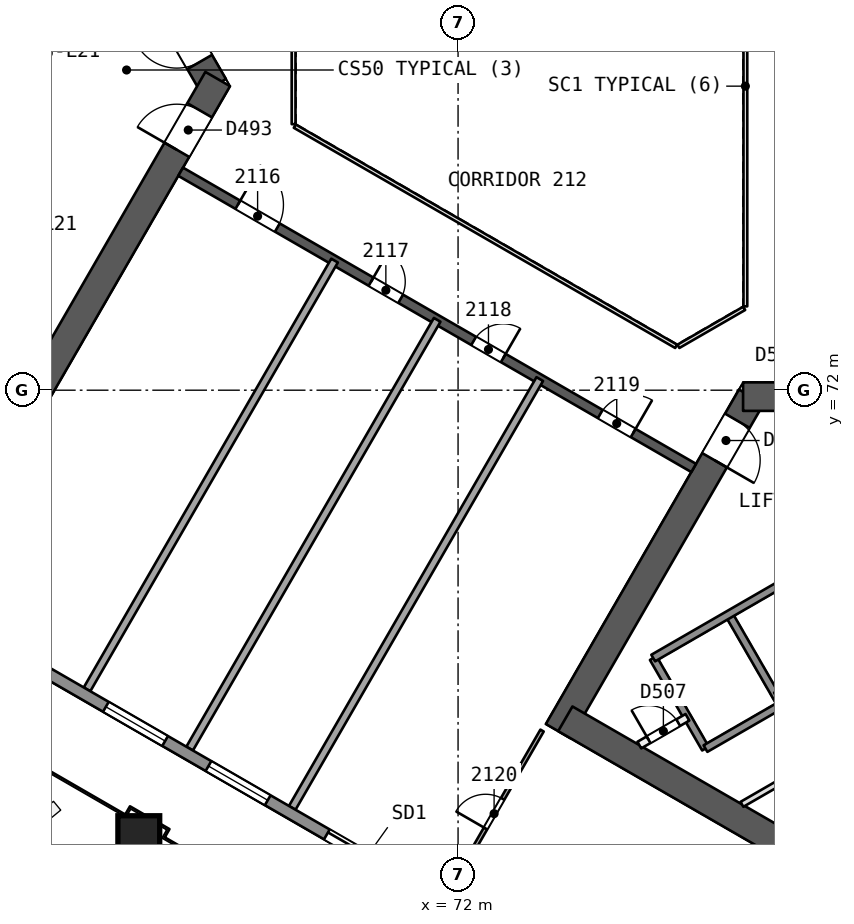
"""IFC4 building model, lengths in metres.
Left out: names, types, materials, properties, quantities, classifications, styles, units other than length and angle.
Written with IfcOpenShell. Run it as: python <this file> out.ifc"""

import sys

from ifc_helpers import new_model, si_unit, direction, frame, frame_2d, origin, origin_2d, place, context, subcontext, project, spatial, rectangle, extrude, element, fill, save


model = new_model("IFC4")
c1 = context("Model", 3, precision=1e-05, world=origin(), true_north=direction((0.0, 1.0)))
c2 = subcontext(c1, "Body", "Model", "MODEL_VIEW")
j1 = project(units=[si_unit("LENGTHUNIT", "METRE"), si_unit("PLANEANGLEUNIT", "RADIAN")], contexts=[c1])
p1 = place(None, origin())
s1 = spatial("IfcSite", under=j1, at=p1, CompositionType="ELEMENT")
p2 = place(p1, origin())
s2 = spatial("IfcBuilding", under=s1, at=p2, CompositionType="ELEMENT")
p3 = place(p2, frame((0.0, 0.0, 90.6)))
s3 = spatial("IfcBuildingStorey", under=s2, at=p3, CompositionType="ELEMENT", Elevation=90.6)
p4 = place(p3, frame((65.567, 80.0, 0.0), z_axis=(0.0, 0.0, 1.0), x_axis=(-0.499988615364, 0.866031976607, 0.0)))
e1 = element("IfcWall", 1, at=p4, inside=s3, PredefinedType="SHEAR", context=c2, shape_type="SweptSolid", body=[
    extrude(rectangle(XDim=10.163, YDim=0.75, at=frame_2d((5.082, 0.0))), origin(), (0.0, 0.0, 1.0), 3.7),
])
p5 = place(p4, frame((0.733, 0.0, 0.0)))
e2 = element("IfcOpeningElement", 2, at=p5, cuts=e1, PredefinedType="OPENING", context=c2, shape_type="SweptSolid", body=[
    extrude(rectangle(XDim=1.2, YDim=2.1, at=frame_2d((0.6, 1.05))), frame((0.0, 0.385, 0.0), z_axis=(0.0, -1.0, 0.0), x_axis=(1.0, 0.0, 0.0)), (0.0, 0.0, 1.0), 0.771),
])
p6 = place(p3, frame((60.673, 71.523, 0.0), z_axis=(0.0, 0.0, 1.0), x_axis=(0.499997052475, 0.866027105532, 0.0)))
e3 = element("IfcWall", 3, at=p6, inside=s3, PredefinedType="SHEAR", context=c2, shape_type="SweptSolid", body=[
    extrude(rectangle(XDim=10.005, YDim=0.75, at=frame_2d((5.002, 0.0))), origin(), (0.0, 0.0, 1.0), 3.7),
])
p7 = place(p6, frame((7.855, 0.0, 0.0)))
e4 = element("IfcOpeningElement", 4, at=p7, cuts=e3, PredefinedType="OPENING", context=c2, shape_type="SweptSolid", body=[
    extrude(rectangle(XDim=1.2, YDim=2.1, at=frame_2d((0.6, 1.05))), frame((0.0, 0.385, 0.0), z_axis=(0.0, -1.0, 0.0), x_axis=(1.0, 0.0, 0.0)), (0.0, 0.0, 1.0), 0.771),
])
p8 = place(p3, frame((79.717, 71.831, 0.0), z_axis=(0.0, 0.0, 1.0), x_axis=(-0.499996230114, -0.866027580318, 0.0)))
e5 = element("IfcWall", 5, at=p8, inside=s3, PredefinedType="SHEAR", context=c2, shape_type="SweptSolid", body=[
    extrude(rectangle(XDim=10.164, YDim=0.75, at=frame_2d((5.082, 0.0))), origin(), (0.0, 0.0, 1.0), 3.7),
])
p9 = place(p8, frame((0.733, 0.0, 0.0)))
e6 = element("IfcOpeningElement", 6, at=p9, cuts=e5, PredefinedType="OPENING", context=c2, shape_type="SweptSolid", body=[
    extrude(rectangle(XDim=1.2, YDim=2.1, at=frame_2d((0.6, 1.05))), frame((0.0, 0.385, 0.0), z_axis=(0.0, -1.0, 0.0), x_axis=(1.0, 0.0, 0.0)), (0.0, 0.0, 1.0), 0.771),
])
p10 = place(p3, frame((74.822, 63.354, 0.0), z_axis=(0.0, 0.0, 1.0), x_axis=(0.8660248072, -0.500001033313, 0.0)))
e7 = element("IfcWall", 7, at=p10, inside=s3, PredefinedType="SHEAR", context=c2, shape_type="SweptSolid", body=[
    extrude(rectangle(XDim=13.958, YDim=0.75, at=frame_2d((6.979, 0.0))), origin(), (0.0, 0.0, 1.0), 3.7),
])
p11 = place(p3, frame((89.505, 71.831, 0.0), z_axis=(0.0, 0.0, 1.0), x_axis=(-1.0, 0.0, 0.0)))
e8 = element("IfcWall", 8, at=p11, inside=s3, PredefinedType="SHEAR", context=c2, shape_type="SweptSolid", body=[
    extrude(rectangle(XDim=10.005, YDim=0.75, at=frame_2d((5.002, 0.0))), origin(), (0.0, 0.0, 1.0), 3.7),
])
p12 = place(p11, frame((7.855, 0.0, 0.0)))
e9 = element("IfcOpeningElement", 9, at=p12, cuts=e8, PredefinedType="OPENING", context=c2, shape_type="SweptSolid", body=[
    extrude(rectangle(XDim=1.2, YDim=2.1, at=frame_2d((0.6, 1.05))), frame((0.0, 0.385, 0.0), z_axis=(0.0, -1.0, 0.0), x_axis=(1.0, 0.0, 0.0)), (0.0, 0.0, 1.0), 0.771),
])
p13 = place(p3, frame((64.7, 77.748, 0.0), z_axis=(0.0, 0.0, 1.0), x_axis=(0.866026492143, -0.499998114903, 0.0)))
e10 = element("IfcWall", 10, at=p13, inside=s3, PredefinedType="SHEAR", context=c2, shape_type="SweptSolid", body=[
    extrude(rectangle(XDim=15.588, YDim=0.25, at=frame_2d((7.794, 0.0))), origin(), (0.0, 0.0, 1.0), 3.2),
])
p14 = place(p13, frame((1.738, 0.0, 0.0)))
e11 = element("IfcOpeningElement", 11, at=p14, cuts=e10, PredefinedType="OPENING", context=c2, shape_type="SweptSolid", body=[
    extrude(rectangle(XDim=1.2, YDim=2.4, at=frame_2d((0.6, 1.2))), frame((0.0, 0.135, 0.0), z_axis=(0.0, -1.0, 0.0), x_axis=(1.0, 0.0, 0.0)), (0.0, 0.0, 1.0), 0.271),
])
p15 = place(p13, frame((5.785, 0.0, 0.0)))
e12 = element("IfcOpeningElement", 12, at=p15, cuts=e10, PredefinedType="OPENING", context=c2, shape_type="SweptSolid", body=[
    extrude(rectangle(XDim=0.9, YDim=2.1, at=frame_2d((0.45, 1.05))), frame((0.0, 0.135, 0.0), z_axis=(0.0, -1.0, 0.0), x_axis=(1.0, 0.0, 0.0)), (0.0, 0.0, 1.0), 0.271),
])
p16 = place(p13, frame((8.903, 0.0, 0.0)))
e13 = element("IfcOpeningElement", 13, at=p16, cuts=e10, PredefinedType="OPENING", context=c2, shape_type="SweptSolid", body=[
    extrude(rectangle(XDim=0.9, YDim=2.1, at=frame_2d((0.45, 1.05))), frame((0.0, 0.135, 0.0), z_axis=(0.0, -1.0, 0.0), x_axis=(1.0, 0.0, 0.0)), (0.0, 0.0, 1.0), 0.271),
])
p17 = place(p13, frame((12.75, 0.0, 0.0)))
e14 = element("IfcOpeningElement", 14, at=p17, cuts=e10, PredefinedType="OPENING", context=c2, shape_type="SweptSolid", body=[
    extrude(rectangle(XDim=1.0, YDim=2.1, at=frame_2d((0.5, 1.05))), frame((0.0, 0.135, 0.0), z_axis=(0.0, -1.0, 0.0), x_axis=(1.0, 0.0, 0.0)), (0.0, 0.0, 1.0), 0.271),
])
p18 = place(p3, frame((63.587, 60.232, 0.0), z_axis=(0.010093620709, 0.017482414954, 0.999796221231), x_axis=(-0.499907122366, -0.865843723195, 0.020187025824)))
e15 = element("IfcColumn", 15, at=p18, inside=s3, PredefinedType="COLUMN", context=c2, shape_type="SweptSolid", body=[
    extrude(rectangle(XDim=1.1, YDim=1.1, at=origin_2d()), origin(), (0.0, 0.0, 1.0), 3.701),
])
for number, where, z_axis, x_axis in (
    (16, (62.236, 64.128, 0.0), (0.0, 0.0, 1.0), (0.5, 0.866, 0.0)),
    (17, (64.936, 62.569, 0.0), (0.0, 0.0, 1.0), (0.5, 0.866, 0.0)),
    (18, (67.636, 61.01, 0.0), (0.0, 0.0, 1.0), (0.5, 0.866, 0.0)),
):
    element("IfcWall", number, at=place(p3, frame(where, z_axis=z_axis, x_axis=x_axis)), inside=s3, PredefinedType="PARTITIONING", context=c2, shape_type="SweptSolid", body=[
        extrude(rectangle(XDim=13.028, YDim=0.2, at=frame_2d((6.514, 0.0))), origin(), (0.0, 0.0, 1.0), 3.2),
    ])
p19 = place(p3, frame((71.686, 58.672, 0.0), z_axis=(0.0, 0.0, 1.0), x_axis=(0.49997221919, 0.866041442448, 0.0)))
e19 = element("IfcWall", 19, at=p19, inside=s3, PredefinedType="PARTITIONING", context=c2, shape_type="SweptSolid", body=[
    extrude(rectangle(XDim=5.049, YDim=0.1, at=frame_2d((2.524, 0.0))), origin(), (0.0, 0.0, 1.0), 3.2),
])
p20 = place(p19, frame((2.074, 0.0, 0.0)))
e20 = element("IfcOpeningElement", 20, at=p20, cuts=e19, PredefinedType="OPENING", context=c2, shape_type="SweptSolid", body=[
    extrude(rectangle(XDim=0.9, YDim=2.1, at=frame_2d((0.45, 1.05))), frame((0.0, 0.061, 0.0), z_axis=(0.0, -1.0, 0.0), x_axis=(1.0, 0.0, 0.0)), (0.0, 0.0, 1.0), 0.121),
])
p21 = place(p3, frame((90.11, 47.863, 0.0), z_axis=(0.0, 0.0, 1.0), x_axis=(-0.866024236478, 0.500002021829, 0.0)))
e21 = element("IfcWall", 21, at=p21, inside=s3, PredefinedType="SOLIDWALL", context=c2, shape_type="SweptSolid", body=[
    extrude(rectangle(XDim=58.307, YDim=0.3, at=frame_2d((29.154, 0.0))), origin(), (0.0, 0.0, 1.0), 3.2),
])
p22 = place(p21, frame((44.133, 0.0, 0.0)))
e22 = element("IfcOpeningElement", 22, at=p22, cuts=e21, PredefinedType="OPENING", context=c2, shape_type="SweptSolid", body=[
    extrude(rectangle(XDim=2.4, YDim=2.4, at=frame_2d((1.2, 1.2))), frame((0.0, 0.161, 0.0), z_axis=(0.0, -1.0, 0.0), x_axis=(1.0, 0.0, 0.0)), (0.0, 0.0, 1.0), 0.321),
])
p23 = place(p21, frame((22.498, 0.0, 0.0)))
e23 = element("IfcOpeningElement", 23, at=p23, cuts=e21, PredefinedType="OPENING", context=c2, shape_type="SweptSolid", body=[
    extrude(rectangle(XDim=2.4, YDim=2.4, at=frame_2d((1.2, 1.2))), frame((0.0, 0.161, 0.0), z_axis=(0.0, -1.0, 0.0), x_axis=(1.0, 0.0, 0.0)), (0.0, 0.0, 1.0), 0.321),
])
p24 = place(p21, frame((10.65, 0.0, 0.0)))
e24 = element("IfcOpeningElement", 24, at=p24, cuts=e21, PredefinedType="OPENING", context=c2, shape_type="SweptSolid", body=[
    extrude(rectangle(XDim=2.4, YDim=2.4, at=frame_2d((1.2, 1.2))), frame((0.0, 0.161, 0.0), z_axis=(0.0, -1.0, 0.0), x_axis=(1.0, 0.0, 0.0)), (0.0, 0.0, 1.0), 0.321),
])
p25 = place(p21, frame((29.812, 0.0, 0.9)))
e25 = element("IfcOpeningElement", 25, at=p25, cuts=e21, PredefinedType="OPENING", context=c2, shape_type="SweptSolid", body=[
    extrude(rectangle(XDim=1.8, YDim=1.5, at=frame_2d((0.9, 0.75))), frame((0.0, 0.161, 0.0), z_axis=(0.0, -1.0, 0.0), x_axis=(1.0, 0.0, 0.0)), (0.0, 0.0, 1.0), 0.321),
])
p26 = place(p21, frame((26.695, 0.0, 0.9)))
e26 = element("IfcOpeningElement", 26, at=p26, cuts=e21, PredefinedType="OPENING", context=c2, shape_type="SweptSolid", body=[
    extrude(rectangle(XDim=1.8, YDim=1.5, at=frame_2d((0.9, 0.75))), frame((0.0, 0.161, 0.0), z_axis=(0.0, -1.0, 0.0), x_axis=(1.0, 0.0, 0.0)), (0.0, 0.0, 1.0), 0.321),
])
for number, where, z_axis, x_axis in (
    (27, (77.135, 64.952, 0.0), (0.0, 0.0, 1.0), (0.5, -0.866, 0.0)),
    (28, (79.127, 66.102, 0.0), (0.0, 0.0, 1.0), (0.5, -0.866, 0.0)),
):
    element("IfcWall", number, at=place(p3, frame(where, z_axis=z_axis, x_axis=x_axis)), inside=s3, PredefinedType="SOLIDWALL", context=c2, shape_type="SweptSolid", body=[
        extrude(rectangle(XDim=2.75, YDim=0.2, at=frame_2d((1.375, 0.0))), origin(), (0.0, 0.0, 1.0), 3.2),
    ])
p27 = place(p3, frame((77.135, 64.952, 0.0), z_axis=(0.0, 0.0, 1.0), x_axis=(0.866031916153, 0.499988720078, 0.0)))
e29 = element("IfcWall", 29, at=p27, inside=s3, PredefinedType="SOLIDWALL", context=c2, shape_type="SweptSolid", body=[
    extrude(rectangle(XDim=11.35, YDim=0.2, at=frame_2d((5.675, 0.0))), origin(), (0.0, 0.0, 1.0), 3.2),
])
p28 = place(p3, frame((76.77, 62.662, 0.0), z_axis=(0.0, 0.0, 1.0), x_axis=(0.866054810376, 0.49994906283, 0.0)))
e30 = element("IfcWall", 30, at=p28, inside=s3, PredefinedType="PARTITIONING", context=c2, shape_type="SweptSolid", body=[
    extrude(rectangle(XDim=1.461, YDim=0.2, at=frame_2d((0.73, 0.0))), origin(), (0.0, 0.0, 1.0), 3.2),
])
p29 = place(p28, frame((0.281, 0.0, 0.0)))
e31 = element("IfcOpeningElement", 31, at=p29, cuts=e30, PredefinedType="OPENING", context=c2, shape_type="SweptSolid", body=[
    extrude(rectangle(XDim=0.9, YDim=2.1, at=frame_2d((0.45, 1.05))), frame((0.0, 0.11, 0.0), z_axis=(0.0, -1.0, 0.0), x_axis=(1.0, 0.0, 0.0)), (0.0, 0.0, 1.0), 0.221),
])
p30 = place(p3, frame((80.367, 63.954, 0.0), z_axis=(0.0, 0.0, 1.0), x_axis=(0.866026575979, 0.499997969693, 0.0)))
e32 = element("IfcWall", 32, at=p30, inside=s3, PredefinedType="SOLIDWALL", context=c2, shape_type="SweptSolid", body=[
    extrude(rectangle(XDim=6.75, YDim=0.2, at=frame_2d((3.375, 0.0))), origin(), (0.0, 0.0, 1.0), 3.2),
])
p31 = place(p3, frame((78.51, 62.57, 0.0), z_axis=(0.0, 0.0, 1.0), x_axis=(0.866053019151, 0.499952165731, 0.0)))
e33 = element("IfcWall", 33, at=p31, inside=s3, PredefinedType="SOLIDWALL", context=c2, shape_type="SweptSolid", body=[
    extrude(rectangle(XDim=2.3, YDim=0.2, at=frame_2d((1.15, 0.0))), origin(), (0.0, 0.0, 1.0), 3.2),
])
p32 = place(p3, frame((79.47, 61.103, 0.0), z_axis=(0.0, 0.0, 1.0), x_axis=(0.866021168401, 0.500007335828, 0.0)))
e34 = element("IfcWall", 34, at=p32, inside=s3, PredefinedType="PARTITIONING", context=c2, shape_type="SweptSolid", body=[
    extrude(rectangle(XDim=2.077, YDim=0.15, at=frame_2d((1.039, 0.0))), origin(), (0.0, 0.0, 1.0), 3.2),
])
p33 = place(p3, frame((79.56, 74.206, 0.0), z_axis=(0.0, 0.0, 1.0), x_axis=(0.0, 1.0, 0.0)))
e35 = element("IfcWall", 35, at=p33, inside=s3, PredefinedType="PARTITIONING", context=c2, shape_type="SweptSolid", body=[
    extrude(rectangle(XDim=11.588, YDim=0.1, at=frame_2d((5.794, 0.0))), origin(), (0.0, 0.0, 1.0), 3.2),
])
p34 = place(p3, frame((67.672, 81.0, 0.0), z_axis=(0.0, 0.0, 1.0), x_axis=(0.0, -1.0, 0.0)))
e36 = element("IfcWall", 36, at=p34, inside=s3, PredefinedType="PARTITIONING", context=c2, shape_type="SweptSolid", body=[
    extrude(rectangle(XDim=2.0, YDim=0.1, at=frame_2d((1.0, 0.0))), origin(), (0.0, 0.0, 1.0), 3.2),
])
p35 = place(p3, frame((67.702, 78.948, 0.0), z_axis=(0.0, 0.0, 1.0), x_axis=(0.866026658274, -0.499997827154, 0.0)))
e37 = element("IfcWall", 37, at=p35, inside=s3, PredefinedType="PARTITIONING", context=c2, shape_type="SweptSolid", body=[
    extrude(rectangle(XDim=11.588, YDim=0.1, at=frame_2d((5.794, 0.0))), origin(), (0.0, 0.0, 1.0), 3.2),
])
p36 = place(p3, frame((77.798, 73.154, 0.0), z_axis=(0.0, 0.0, 1.0), x_axis=(0.866041268327, 0.499972520799, 0.0)))
e38 = element("IfcWall", 38, at=p36, inside=s3, PredefinedType="PARTITIONING", context=c2, shape_type="SweptSolid", body=[
    extrude(rectangle(XDim=2.0, YDim=0.1, at=frame_2d((1.0, 0.0))), origin(), (0.0, 0.0, 1.0), 3.2),
])
p37 = place(p14, origin())
e39 = element("IfcDoor", 39, at=p37, inside=s3, OperationType="SINGLE_SWING_LEFT", PredefinedType="NOTDEFINED", context=c2, shape_type="SweptSolid", body=[
    extrude(rectangle(XDim=1.2, YDim=2.4, at=frame_2d((0.6, 1.2))), frame((0.0, 0.025, 0.0), z_axis=(0.0, -1.0, 0.0), x_axis=(1.0, 0.0, 0.0)), (0.0, 0.0, 1.0), 0.05),
])
fill(e11, e39)
p38 = place(p15, origin())
e40 = element("IfcDoor", 40, at=p38, inside=s3, OperationType="SINGLE_SWING_LEFT", PredefinedType="NOTDEFINED", context=c2, shape_type="SweptSolid", body=[
    extrude(rectangle(XDim=0.9, YDim=2.1, at=frame_2d((0.45, 1.05))), frame((0.0, 0.025, 0.0), z_axis=(0.0, -1.0, 0.0), x_axis=(1.0, 0.0, 0.0)), (0.0, 0.0, 1.0), 0.05),
])
fill(e12, e40)
p39 = place(p16, origin())
e41 = element("IfcDoor", 41, at=p39, inside=s3, OperationType="SINGLE_SWING_RIGHT", PredefinedType="NOTDEFINED", context=c2, shape_type="SweptSolid", body=[
    extrude(rectangle(XDim=0.9, YDim=2.1, at=frame_2d((0.45, 1.05))), frame((0.0, 0.025, 0.0), z_axis=(0.0, -1.0, 0.0), x_axis=(1.0, 0.0, 0.0)), (0.0, 0.0, 1.0), 0.05),
])
fill(e13, e41)
p40 = place(p17, origin())
e42 = element("IfcDoor", 42, at=p40, inside=s3, OperationType="SINGLE_SWING_RIGHT", PredefinedType="NOTDEFINED", context=c2, shape_type="SweptSolid", body=[
    extrude(rectangle(XDim=1.0, YDim=2.1, at=frame_2d((0.5, 1.05))), frame((0.0, 0.025, 0.0), z_axis=(0.0, -1.0, 0.0), x_axis=(1.0, 0.0, 0.0)), (0.0, 0.0, 1.0), 0.05),
])
fill(e14, e42)
p41 = place(p20, origin())
e43 = element("IfcDoor", 43, at=p41, inside=s3, OperationType="SINGLE_SWING_LEFT", PredefinedType="NOTDEFINED", context=c2, shape_type="SweptSolid", body=[
    extrude(rectangle(XDim=0.9, YDim=2.1, at=frame_2d((0.45, 1.05))), frame((0.0, 0.025, 0.0), z_axis=(0.0, -1.0, 0.0), x_axis=(1.0, 0.0, 0.0)), (0.0, 0.0, 1.0), 0.05),
])
fill(e20, e43)
p42 = place(p23, origin())
e44 = element("IfcDoor", 44, at=p42, inside=s3, OperationType="SLIDING_TO_RIGHT", PredefinedType="NOTDEFINED", context=c2, shape_type="SweptSolid", body=[
    extrude(rectangle(XDim=2.4, YDim=2.4, at=frame_2d((1.2, 1.2))), frame((0.0, 0.025, 0.0), z_axis=(0.0, -1.0, 0.0), x_axis=(1.0, 0.0, 0.0)), (0.0, 0.0, 1.0), 0.05),
])
fill(e23, e44)
p43 = place(p25, origin())
e45 = element("IfcWindow", 45, at=p43, inside=s3, PartitioningType="SINGLE_PANEL", PredefinedType="WINDOW", context=c2, shape_type="SweptSolid", body=[
    extrude(rectangle(XDim=1.8, YDim=1.5, at=frame_2d((0.9, 0.75))), frame((0.0, 0.03, 0.0), z_axis=(0.0, -1.0, 0.0), x_axis=(1.0, 0.0, 0.0)), (0.0, 0.0, 1.0), 0.06),
])
fill(e25, e45)
p44 = place(p26, origin())
e46 = element("IfcWindow", 46, at=p44, inside=s3, PartitioningType="SINGLE_PANEL", PredefinedType="WINDOW", context=c2, shape_type="SweptSolid", body=[
    extrude(rectangle(XDim=1.8, YDim=1.5, at=frame_2d((0.9, 0.75))), frame((0.0, 0.03, 0.0), z_axis=(0.0, -1.0, 0.0), x_axis=(1.0, 0.0, 0.0)), (0.0, 0.0, 1.0), 0.06),
])
fill(e26, e46)
p45 = place(p5, origin())
e47 = element("IfcDoor", 47, at=p45, inside=s3, OperationType="SINGLE_SWING_RIGHT", PredefinedType="NOTDEFINED", context=c2, shape_type="SweptSolid", body=[
    extrude(rectangle(XDim=1.2, YDim=2.1, at=frame_2d((0.6, 1.05))), frame((0.0, 0.025, 0.0), z_axis=(0.0, -1.0, 0.0), x_axis=(1.0, 0.0, 0.0)), (0.0, 0.0, 1.0), 0.05),
])
fill(e2, e47)
p46 = place(p7, origin())
e48 = element("IfcDoor", 48, at=p46, inside=s3, OperationType="SINGLE_SWING_LEFT", PredefinedType="NOTDEFINED", context=c2, shape_type="SweptSolid", body=[
    extrude(rectangle(XDim=1.2, YDim=2.1, at=frame_2d((0.6, 1.05))), frame((0.0, 0.025, 0.0), z_axis=(0.0, -1.0, 0.0), x_axis=(1.0, 0.0, 0.0)), (0.0, 0.0, 1.0), 0.05),
])
fill(e4, e48)
p47 = place(p9, origin())
e49 = element("IfcDoor", 49, at=p47, inside=s3, OperationType="SINGLE_SWING_RIGHT", PredefinedType="NOTDEFINED", context=c2, shape_type="SweptSolid", body=[
    extrude(rectangle(XDim=1.2, YDim=2.1, at=frame_2d((0.6, 1.05))), frame((0.0, 0.025, 0.0), z_axis=(0.0, -1.0, 0.0), x_axis=(1.0, 0.0, 0.0)), (0.0, 0.0, 1.0), 0.05),
])
fill(e6, e49)
p48 = place(p29, origin())
e50 = element("IfcDoor", 50, at=p48, inside=s3, OperationType="SINGLE_SWING_LEFT", PredefinedType="NOTDEFINED", context=c2, shape_type="SweptSolid", body=[
    extrude(rectangle(XDim=0.9, YDim=2.1, at=frame_2d((0.45, 1.05))), frame((0.0, 0.025, 0.0), z_axis=(0.0, -1.0, 0.0), x_axis=(1.0, 0.0, 0.0)), (0.0, 0.0, 1.0), 0.05),
])
fill(e31, e50)
save(model, sys.argv[1])
